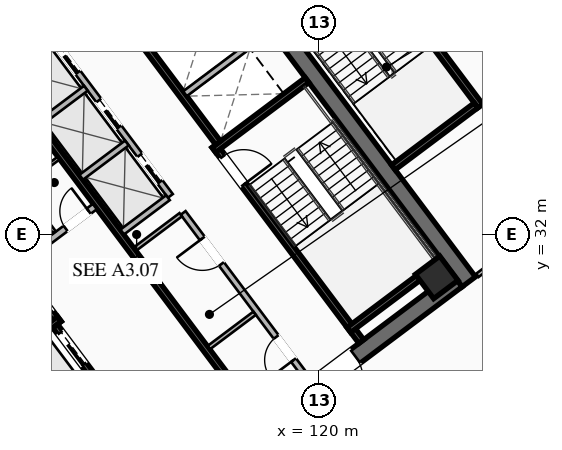
"""IFC4 building model, lengths in metres.
Left out: names, types, materials, properties, quantities, classifications, styles, units other than length and angle.
Written with IfcOpenShell. Run it as: python <this file> out.ifc"""

import sys

from ifc_helpers import new_model, si_unit, direction, frame, frame_2d, origin, origin_2d, place, context, subcontext, project, spatial, rectangle, hollow_rectangle, extrude, element, fill, save


model = new_model("IFC4")
c1 = context("Model", 3, precision=1e-05, world=origin(), true_north=direction((0.0, 1.0)))
c2 = subcontext(c1, "Body", "Model", "MODEL_VIEW")
j1 = project(units=[si_unit("LENGTHUNIT", "METRE"), si_unit("PLANEANGLEUNIT", "RADIAN")], contexts=[c1])
p1 = place(None, origin())
s1 = spatial("IfcSite", under=j1, at=p1, CompositionType="ELEMENT")
p2 = place(p1, origin())
s2 = spatial("IfcBuilding", under=s1, at=p2, CompositionType="ELEMENT")
p3 = place(p2, frame((0.0, 0.0, 188.95)))
s3 = spatial("IfcBuildingStorey", under=s2, at=p3, CompositionType="ELEMENT", Elevation=188.95)
for number, where, z_axis, x_axis in (
    (1, (112.436, 21.077, 0.0), (0.0, 0.0, 1.0), (-0.6, 0.8, 0.0)),
    (2, (115.564, 42.923, 0.0), (0.0, 0.0, 1.0), (0.6, -0.8, 0.0)),
):
    element("IfcWall", number, at=place(p3, frame(where, z_axis=z_axis, x_axis=x_axis)), inside=s3, PredefinedType="SHEAR", context=c2, shape_type="SweptSolid", body=[
        extrude(rectangle(XDim=15.6, YDim=0.55, at=frame_2d((7.8, 0.0))), origin(), (0.0, 0.0, 1.0), 3.55),
    ])
p4 = place(p3, frame((124.539, 30.498, 0.0), z_axis=(0.0, 0.0, 1.0), x_axis=(-0.799998054672, -0.600002593761, 0.0)))
e3 = element("IfcWall", 3, at=p4, inside=s3, PredefinedType="SHEAR", context=c2, shape_type="SweptSolid", body=[
    extrude(rectangle(XDim=15.06, YDim=0.55, at=frame_2d((7.53, 0.0))), origin(), (0.0, 0.0, 1.0), 3.55),
])
p5 = place(p4, frame((9.23, 0.0, 0.0)))
e4 = element("IfcOpeningElement", 4, at=p5, cuts=e3, PredefinedType="OPENING", context=c2, shape_type="SweptSolid", body=[
    extrude(rectangle(XDim=1.25, YDim=2.25, at=frame_2d((0.625, 1.125))), frame((0.0, 0.285, 0.0), z_axis=(0.0, -1.0, 0.0), x_axis=(1.0, 0.0, 0.0)), (0.0, 0.0, 1.0), 0.57),
])
p6 = place(p4, frame((4.18, 0.0, 0.0)))
e5 = element("IfcOpeningElement", 5, at=p6, cuts=e3, PredefinedType="OPENING", context=c2, shape_type="SweptSolid", body=[
    extrude(rectangle(XDim=1.25, YDim=2.25, at=frame_2d((0.625, 1.125))), frame((0.0, 0.285, 0.0), z_axis=(0.0, -1.0, 0.0), x_axis=(1.0, 0.0, 0.0)), (0.0, 0.0, 1.0), 0.57),
])
p7 = place(p3, frame((103.461, 33.502, 0.0), z_axis=(0.0, 0.0, 1.0), x_axis=(0.799998054672, 0.600002593761, 0.0)))
e6 = element("IfcWall", 6, at=p7, inside=s3, PredefinedType="SHEAR", context=c2, shape_type="SweptSolid", body=[
    extrude(rectangle(XDim=15.06, YDim=0.55, at=frame_2d((7.53, 0.0))), origin(), (0.0, 0.0, 1.0), 3.55),
])
p8 = place(p7, frame((4.58, 0.0, 0.0)))
e7 = element("IfcOpeningElement", 7, at=p8, cuts=e6, PredefinedType="OPENING", context=c2, shape_type="SweptSolid", body=[
    extrude(rectangle(XDim=1.25, YDim=2.25, at=frame_2d((0.625, 1.125))), frame((0.0, 0.285, 0.0), z_axis=(0.0, -1.0, 0.0), x_axis=(1.0, 0.0, 0.0)), (0.0, 0.0, 1.0), 0.57),
])
p9 = place(p7, frame((9.63, 0.0, 0.0)))
e8 = element("IfcOpeningElement", 8, at=p9, cuts=e6, PredefinedType="OPENING", context=c2, shape_type="SweptSolid", body=[
    extrude(rectangle(XDim=1.25, YDim=2.25, at=frame_2d((0.625, 1.125))), frame((0.0, 0.285, 0.0), z_axis=(0.0, -1.0, 0.0), x_axis=(1.0, 0.0, 0.0)), (0.0, 0.0, 1.0), 0.57),
])
p10 = place(p3, frame((123.87, 30.59, 0.0), z_axis=(0.0, 0.0, 1.0), x_axis=(0.799999996291, 0.600000004945, 0.0)))
e9 = element("IfcColumn", 9, at=p10, inside=s3, PredefinedType="COLUMN", context=c2, shape_type="SweptSolid", body=[
    extrude(hollow_rectangle(XDim=1.0, YDim=1.0, WallThickness=0.04, at=origin_2d()), origin(), (0.0, 0.0, 1.0), 3.37),
])
p11 = place(p3, frame((111.44, 29.08, 0.0), z_axis=(0.0, 0.0, 1.0), x_axis=(-0.59999029481, 0.8000072788, 0.0)))
e10 = element("IfcWall", 10, at=p11, inside=s3, PredefinedType="SHEAR", context=c2, shape_type="SweptSolid", body=[
    extrude(rectangle(XDim=8.05, YDim=0.2, at=frame_2d((4.025, 0.0))), origin(), (0.0, 0.0, 1.0), 3.37),
])
p12 = place(p11, frame((0.45, 0.0, 0.0)))
e11 = element("IfcOpeningElement", 11, at=p12, cuts=e10, PredefinedType="OPENING", context=c2, shape_type="SweptSolid", body=[
    extrude(rectangle(XDim=1.15, YDim=2.2, at=frame_2d((0.575, 1.1))), frame((0.0, 0.11, 0.0), z_axis=(0.0, -1.0, 0.0), x_axis=(1.0, 0.0, 0.0)), (0.0, 0.0, 1.0), 0.22),
])
p13 = place(p3, frame((108.396, 26.922, 0.0), z_axis=(0.0, 0.0, 1.0), x_axis=(0.800015298837, 0.599979601008, 0.0)))
e12 = element("IfcWall", 12, at=p13, inside=s3, PredefinedType="SHEAR", context=c2, shape_type="SweptSolid", body=[
    extrude(rectangle(XDim=3.83, YDim=0.2, at=frame_2d((1.915, 0.0))), origin(), (0.0, 0.0, 1.0), 3.37),
])
p14 = place(p3, frame((116.56, 34.92, 0.0), z_axis=(0.0, 0.0, 1.0), x_axis=(0.59999029481, -0.8000072788, 0.0)))
e13 = element("IfcWall", 13, at=p14, inside=s3, PredefinedType="SHEAR", context=c2, shape_type="SweptSolid", body=[
    extrude(rectangle(XDim=8.05, YDim=0.2, at=frame_2d((4.025, 0.0))), origin(), (0.0, 0.0, 1.0), 3.37),
])
p15 = place(p14, frame((0.45, 0.0, 0.0)))
e14 = element("IfcOpeningElement", 14, at=p15, cuts=e13, PredefinedType="OPENING", context=c2, shape_type="SweptSolid", body=[
    extrude(rectangle(XDim=1.15, YDim=2.2, at=frame_2d((0.575, 1.1))), frame((0.0, 0.11, 0.0), z_axis=(0.0, -1.0, 0.0), x_axis=(1.0, 0.0, 0.0)), (0.0, 0.0, 1.0), 0.22),
])
for number, where, z_axis, x_axis in (
    (15, (116.54, 34.78, 0.0), (0.0, 0.0, 1.0), (0.8, 0.6, 0.0)),
    (16, (120.98, 28.86, 0.0), (0.0, 0.0, 1.0), (0.8, 0.6, 0.0)),
):
    element("IfcWall", number, at=place(p3, frame(where, z_axis=z_axis, x_axis=x_axis)), inside=s3, PredefinedType="SHEAR", context=c2, shape_type="SweptSolid", body=[
        extrude(rectangle(XDim=3.83, YDim=0.2, at=frame_2d((1.915, 0.0))), origin(), (0.0, 0.0, 1.0), 3.37),
    ])
p16 = place(p3, frame((117.998, 25.936, 0.0), z_axis=(0.0, 0.0, 1.0), x_axis=(-0.600002693989, 0.799997979501, 0.0)))
e17 = element("IfcWall", 17, at=p16, inside=s3, PredefinedType="SHEAR", context=c2, shape_type="SweptSolid", body=[
    extrude(rectangle(XDim=14.5, YDim=0.2, at=frame_2d((7.25, 0.0))), origin(), (0.0, 0.0, 1.0), 3.37),
])
p17 = place(p3, frame((110.104, 31.028, 0.0), z_axis=(0.0, 0.0, 1.0), x_axis=(0.800018601094, 0.59997519774, 0.0)))
e18 = element("IfcWall", 18, at=p17, inside=s3, PredefinedType="SOLIDWALL", context=c2, shape_type="SweptSolid", body=[
    extrude(rectangle(XDim=3.15, YDim=0.22, at=frame_2d((1.575, 0.0))), origin(), (0.0, 0.0, 1.0), 2.723),
])
p18 = place(p17, frame((0.25, 0.0, 0.0)))
e19 = element("IfcOpeningElement", 19, at=p18, cuts=e18, PredefinedType="OPENING", context=c2, shape_type="SweptSolid", body=[
    extrude(rectangle(XDim=0.95, YDim=2.05, at=frame_2d((0.475, 1.025))), frame((0.0, 0.12, 0.0), z_axis=(0.0, -1.0, 0.0), x_axis=(1.0, 0.0, 0.0)), (0.0, 0.0, 1.0), 0.24),
])
p19 = place(p17, frame((1.95, 0.0, 0.0)))
e20 = element("IfcOpeningElement", 20, at=p19, cuts=e18, PredefinedType="OPENING", context=c2, shape_type="SweptSolid", body=[
    extrude(rectangle(XDim=0.95, YDim=2.05, at=frame_2d((0.475, 1.025))), frame((0.0, 0.12, 0.0), z_axis=(0.0, -1.0, 0.0), x_axis=(1.0, 0.0, 0.0)), (0.0, 0.0, 1.0), 0.24),
])
p20 = place(p3, frame((115.19, 23.83, 0.0), z_axis=(0.0, 0.0, 1.0), x_axis=(-0.599993943644, 0.800004542231, 0.0)))
e21 = element("IfcWall", 21, at=p20, inside=s3, PredefinedType="SHEAR", context=c2, shape_type="SweptSolid", body=[
    extrude(rectangle(XDim=6.45, YDim=0.2, at=frame_2d((3.225, 0.0))), origin(), (0.0, 0.0, 1.0), 3.37),
])
p21 = place(p20, frame((4.875, 0.0, 0.0)))
e22 = element("IfcOpeningElement", 22, at=p21, cuts=e21, PredefinedType="OPENING", context=c2, shape_type="SweptSolid", body=[
    extrude(rectangle(XDim=1.3, YDim=2.25, at=frame_2d((0.65, 1.125))), frame((0.0, 0.11, 0.0), z_axis=(0.0, -1.0, 0.0), x_axis=(1.0, 0.0, 0.0)), (0.0, 0.0, 1.0), 0.22),
])
p22 = place(p20, frame((2.875, 0.0, 0.0)))
e23 = element("IfcOpeningElement", 23, at=p22, cuts=e21, PredefinedType="OPENING", context=c2, shape_type="SweptSolid", body=[
    extrude(rectangle(XDim=1.3, YDim=2.25, at=frame_2d((0.65, 1.125))), frame((0.0, 0.11, 0.0), z_axis=(0.0, -1.0, 0.0), x_axis=(1.0, 0.0, 0.0)), (0.0, 0.0, 1.0), 0.22),
])
p23 = place(p20, frame((0.675, 0.0, 0.0)))
e24 = element("IfcOpeningElement", 24, at=p23, cuts=e21, PredefinedType="OPENING", context=c2, shape_type="SweptSolid", body=[
    extrude(rectangle(XDim=1.3, YDim=2.25, at=frame_2d((0.65, 1.125))), frame((0.0, 0.11, 0.0), z_axis=(0.0, -1.0, 0.0), x_axis=(1.0, 0.0, 0.0)), (0.0, 0.0, 1.0), 0.22),
])
p24 = place(p3, frame((112.81, 40.17, 0.0), z_axis=(0.0, 0.0, 1.0), x_axis=(0.599993943644, -0.800004542231, 0.0)))
e25 = element("IfcWall", 25, at=p24, inside=s3, PredefinedType="SHEAR", context=c2, shape_type="SweptSolid", body=[
    extrude(rectangle(XDim=6.45, YDim=0.2, at=frame_2d((3.225, 0.0))), origin(), (0.0, 0.0, 1.0), 3.37),
])
p25 = place(p3, frame((115.59, 36.63, 0.0), z_axis=(0.0, 0.0, 1.0), x_axis=(0.799974743577, 0.600033673754, 0.0)))
e26 = element("IfcWall", 26, at=p25, inside=s3, PredefinedType="SOLIDWALL", context=c2, shape_type="SweptSolid", body=[
    extrude(rectangle(XDim=3.48, YDim=0.2, at=frame_2d((1.74, 0.0))), origin(), (0.0, 0.0, 1.0), 3.37),
])
p26 = place(p3, frame((111.296, 32.072, 0.0), z_axis=(0.0, 0.0, 1.0), x_axis=(-0.59995887973, 0.800030838552, 0.0)))
e27 = element("IfcWall", 27, at=p26, inside=s3, PredefinedType="PARTITIONING", context=c2, shape_type="SweptSolid", body=[
    extrude(rectangle(XDim=3.8, YDim=0.11, at=frame_2d((1.9, 0.0))), origin(), (0.0, 0.0, 1.0), 2.723),
])
p27 = place(p3, frame((108.91, 32.62, 0.0), z_axis=(0.0, 0.0, 1.0), x_axis=(0.800018601094, 0.59997519774, 0.0)))
e28 = element("IfcWall", 28, at=p27, inside=s3, PredefinedType="PARTITIONING", context=c2, shape_type="SweptSolid", body=[
    extrude(rectangle(XDim=3.15, YDim=0.11, at=frame_2d((1.575, 0.0))), origin(), (0.0, 0.0, 1.0), 2.723),
])
p28 = place(p3, frame((119.67, 27.19, 0.0), z_axis=(0.0, 0.0, 1.0), x_axis=(-0.599988677396, 0.800008491828, 0.0)))
e29 = element("IfcWall", 29, at=p28, inside=s3, PredefinedType="SOLIDWALL", context=c2, shape_type="SweptSolid", body=[
    extrude(rectangle(XDim=6.9, YDim=0.2, at=frame_2d((3.45, 0.0))), origin(), (0.0, 0.0, 1.0), 2.723),
])
p29 = place(p28, frame((0.85, 0.0, 0.0)))
e30 = element("IfcOpeningElement", 30, at=p29, cuts=e29, PredefinedType="OPENING", context=c2, shape_type="SweptSolid", body=[
    extrude(rectangle(XDim=0.95, YDim=2.05, at=frame_2d((0.475, 1.025))), frame((0.0, 0.11, 0.0), z_axis=(0.0, -1.0, 0.0), x_axis=(1.0, 0.0, 0.0)), (0.0, 0.0, 1.0), 0.22),
])
p30 = place(p28, frame((4.8, 0.0, 0.0)))
e31 = element("IfcOpeningElement", 31, at=p30, cuts=e29, PredefinedType="OPENING", context=c2, shape_type="SweptSolid", body=[
    extrude(rectangle(XDim=1.05, YDim=2.2, at=frame_2d((0.525, 1.1))), frame((0.0, 0.11, 0.0), z_axis=(0.0, -1.0, 0.0), x_axis=(1.0, 0.0, 0.0)), (0.0, 0.0, 1.0), 0.22),
])
for number, where, z_axis, x_axis in (
    (32, (113.946, 31.522, 0.0), (0.0, 0.0, 1.0), (0.8, 0.6, 0.0)),
    (33, (116.376, 28.282, 0.0), (0.0, 0.0, 1.0), (0.8, 0.6, 0.0)),
):
    element("IfcWall", number, at=place(p3, frame(where, z_axis=z_axis, x_axis=x_axis)), inside=s3, PredefinedType="PARTITIONING", context=c2, shape_type="SweptSolid", body=[
        extrude(rectangle(XDim=1.88, YDim=0.135, at=frame_2d((0.94, 0.0))), origin(), (0.0, 0.0, 1.0), 2.723),
    ])
p31 = place(p3, frame((115.11, 33.27, 0.0), z_axis=(0.0, 0.0, 1.0), x_axis=(-0.600011322243, 0.799991508192, 0.0)))
e34 = element("IfcWall", 34, at=p31, inside=s3, PredefinedType="SOLIDWALL", context=c2, shape_type="SweptSolid", body=[
    extrude(rectangle(XDim=6.9, YDim=0.2, at=frame_2d((3.45, 0.0))), origin(), (0.0, 0.0, 1.0), 3.37),
])
p32 = place(p31, frame((0.575, 0.0, 0.0)))
e35 = element("IfcOpeningElement", 35, at=p32, cuts=e34, PredefinedType="OPENING", context=c2, shape_type="SweptSolid", body=[
    extrude(rectangle(XDim=1.1, YDim=2.2, at=frame_2d((0.55, 1.1))), frame((0.0, 0.11, 0.0), z_axis=(0.0, -1.0, 0.0), x_axis=(1.0, 0.0, 0.0)), (0.0, 0.0, 1.0), 0.22),
])
p33 = place(p31, frame((2.825, 0.0, 0.0)))
e36 = element("IfcOpeningElement", 36, at=p33, cuts=e34, PredefinedType="OPENING", context=c2, shape_type="SweptSolid", body=[
    extrude(rectangle(XDim=1.1, YDim=2.2, at=frame_2d((0.55, 1.1))), frame((0.0, 0.11, 0.0), z_axis=(0.0, -1.0, 0.0), x_axis=(1.0, 0.0, 0.0)), (0.0, 0.0, 1.0), 0.22),
])
p34 = place(p31, frame((5.075, 0.0, 0.0)))
e37 = element("IfcOpeningElement", 37, at=p34, cuts=e34, PredefinedType="OPENING", context=c2, shape_type="SweptSolid", body=[
    extrude(rectangle(XDim=1.1, YDim=2.2, at=frame_2d((0.55, 1.1))), frame((0.0, 0.11, 0.0), z_axis=(0.0, -1.0, 0.0), x_axis=(1.0, 0.0, 0.0)), (0.0, 0.0, 1.0), 0.22),
])
p35 = place(p3, frame((113.526, 32.082, 0.0), z_axis=(0.0, 0.0, 1.0), x_axis=(0.800046745961, 0.599937666993, 0.0)))
e38 = element("IfcWall", 38, at=p35, inside=s3, PredefinedType="SOLIDWALL", context=c2, shape_type="SweptSolid", body=[
    extrude(rectangle(XDim=1.88, YDim=0.2, at=frame_2d((0.94, 0.0))), origin(), (0.0, 0.0, 1.0), 3.37),
])
p36 = place(p3, frame((112.176, 33.882, 0.0), z_axis=(0.0, 0.0, 1.0), x_axis=(0.8, 0.6, 0.0)))
e39 = element("IfcWall", 39, at=p36, inside=s3, PredefinedType="SOLIDWALL", context=c2, shape_type="SweptSolid", body=[
    extrude(rectangle(XDim=1.88, YDim=0.2, at=frame_2d((0.94, 0.0))), origin(), (0.0, 0.0, 1.0), 3.37),
])
p37 = place(p3, frame((110.826, 35.682, 0.0), z_axis=(0.0, 0.0, 1.0), x_axis=(0.799984418148, 0.600020775241, 0.0)))
e40 = element("IfcWall", 40, at=p37, inside=s3, PredefinedType="SOLIDWALL", context=c2, shape_type="SweptSolid", body=[
    extrude(rectangle(XDim=1.88, YDim=0.2, at=frame_2d((0.94, 0.0))), origin(), (0.0, 0.0, 1.0), 3.37),
])
p38 = place(p3, frame((125.304, 36.228, 0.0), z_axis=(0.0, 0.0, 1.0), x_axis=(-0.59998851072, 0.800008616831, 0.0)))
e41 = element("IfcWall", 41, at=p38, inside=s3, PredefinedType="SHEAR", context=c2, shape_type="SweptSolid", body=[
    extrude(rectangle(XDim=6.8, YDim=0.2, at=frame_2d((3.4, 0.0))), origin(), (0.0, 0.0, 1.0), 3.37),
])
p39 = place(p3, frame((122.444, 34.208, 0.0), z_axis=(0.0, 0.0, 1.0), x_axis=(0.79999138319, 0.600011488909, 0.0)))
e42 = element("IfcWall", 42, at=p39, inside=s3, PredefinedType="SHEAR", context=c2, shape_type="SweptSolid", body=[
    extrude(rectangle(XDim=3.4, YDim=0.2, at=frame_2d((1.7, 0.0))), origin(), (0.0, 0.0, 1.0), 3.37),
])
p40 = place(p3, frame((95.638, 32.566, 0.0), z_axis=(0.0, 0.0, 1.0), x_axis=(0.8, 0.6, 0.0)))
e43 = element("IfcWall", 43, at=p40, inside=s3, PredefinedType="PARTITIONING", context=c2, shape_type="SweptSolid", body=[
    extrude(rectangle(XDim=28.7, YDim=0.135, at=frame_2d((14.35, 0.0))), origin(), (0.0, 0.0, 1.0), 2.723),
])
p41 = place(p40, frame((0.3, 0.0, 0.0)))
e44 = element("IfcOpeningElement", 44, at=p41, cuts=e43, PredefinedType="OPENING", context=c2, shape_type="SweptSolid", body=[
    extrude(rectangle(XDim=0.95, YDim=2.05, at=frame_2d((0.475, 1.025))), frame((0.0, 0.077, 0.0), z_axis=(0.0, -1.0, 0.0), x_axis=(1.0, 0.0, 0.0)), (0.0, 0.0, 1.0), 0.155),
])
p42 = place(p40, frame((14.083, 0.0, 0.0)))
e45 = element("IfcOpeningElement", 45, at=p42, cuts=e43, PredefinedType="OPENING", context=c2, shape_type="SweptSolid", body=[
    extrude(rectangle(XDim=0.95, YDim=2.05, at=frame_2d((0.475, 1.025))), frame((0.0, 0.077, 0.0), z_axis=(0.0, -1.0, 0.0), x_axis=(1.0, 0.0, 0.0)), (0.0, 0.0, 1.0), 0.155),
])
p43 = place(p40, frame((27.45, 0.0, 0.0)))
e46 = element("IfcOpeningElement", 46, at=p43, cuts=e43, PredefinedType="OPENING", context=c2, shape_type="SweptSolid", body=[
    extrude(rectangle(XDim=0.95, YDim=2.05, at=frame_2d((0.475, 1.025))), frame((0.0, 0.077, 0.0), z_axis=(0.0, -1.0, 0.0), x_axis=(1.0, 0.0, 0.0)), (0.0, 0.0, 1.0), 0.155),
])
p44 = place(p3, frame((131.87, 32.09, 0.0), z_axis=(0.0, 0.0, 1.0), x_axis=(-0.800003062365, -0.599995916825, 0.0)))
e47 = element("IfcWall", 47, at=p44, inside=s3, PredefinedType="PARTITIONING", context=c2, shape_type="SweptSolid", body=[
    extrude(rectangle(XDim=28.7, YDim=0.135, at=frame_2d((14.35, 0.0))), origin(), (0.0, 0.0, 1.0), 2.723),
])
p45 = place(p44, frame((27.37, 0.0, 0.0)))
e48 = element("IfcOpeningElement", 48, at=p45, cuts=e47, PredefinedType="OPENING", context=c2, shape_type="SweptSolid", body=[
    extrude(rectangle(XDim=0.95, YDim=2.05, at=frame_2d((0.475, 1.025))), frame((0.0, 0.077, 0.0), z_axis=(0.0, -1.0, 0.0), x_axis=(1.0, 0.0, 0.0)), (0.0, 0.0, 1.0), 0.155),
])
p46 = place(p44, frame((13.638, 0.0, 0.0)))
e49 = element("IfcOpeningElement", 49, at=p46, cuts=e47, PredefinedType="OPENING", context=c2, shape_type="SweptSolid", body=[
    extrude(rectangle(XDim=0.95, YDim=2.05, at=frame_2d((0.475, 1.025))), frame((0.0, 0.077, 0.0), z_axis=(0.0, -1.0, 0.0), x_axis=(1.0, 0.0, 0.0)), (0.0, 0.0, 1.0), 0.155),
])
p47 = place(p44, frame((0.38, 0.0, 0.0)))
e50 = element("IfcOpeningElement", 50, at=p47, cuts=e47, PredefinedType="OPENING", context=c2, shape_type="SweptSolid", body=[
    extrude(rectangle(XDim=0.95, YDim=2.05, at=frame_2d((0.475, 1.025))), frame((0.0, 0.077, 0.0), z_axis=(0.0, -1.0, 0.0), x_axis=(1.0, 0.0, 0.0)), (0.0, 0.0, 1.0), 0.155),
])
p48 = place(p3, frame((125.208, 30.656, 0.0), z_axis=(0.0, 0.0, 1.0), x_axis=(0.800006797429, 0.599990936654, 0.0)))
e51 = element("IfcWall", 51, at=p48, inside=s3, PredefinedType="PARTITIONING", context=c2, shape_type="SweptSolid", body=[
    extrude(rectangle(XDim=8.62, YDim=0.135, at=frame_2d((4.31, 0.0))), origin(), (0.0, 0.0, 1.0), 2.723),
])
p49 = place(p48, frame((2.045, 0.0, 0.0)))
e52 = element("IfcOpeningElement", 52, at=p49, cuts=e51, PredefinedType="OPENING", context=c2, shape_type="SweptSolid", body=[
    extrude(rectangle(XDim=0.95, YDim=2.05, at=frame_2d((0.475, 1.025))), frame((0.0, 0.077, 0.0), z_axis=(0.0, -1.0, 0.0), x_axis=(1.0, 0.0, 0.0)), (0.0, 0.0, 1.0), 0.155),
])
p50 = place(p3, frame((112.104, 20.928, 0.0), z_axis=(0.0, 0.0, 1.0), x_axis=(-0.599994940075, 0.800003794918, 0.0)))
e53 = element("IfcWall", 53, at=p50, inside=s3, PredefinedType="PARTITIONING", context=c2, shape_type="SweptSolid", body=[
    extrude(rectangle(XDim=15.44, YDim=0.135, at=frame_2d((7.72, 0.0))), origin(), (0.0, 0.0, 1.0), 2.723),
])
p51 = place(p6, origin())
e54 = element("IfcDoor", 54, at=p51, inside=s3, OperationType="SINGLE_SWING_RIGHT", PredefinedType="DOOR", context=c2, shape_type="SweptSolid", body=[
    extrude(rectangle(XDim=1.25, YDim=2.25, at=frame_2d((0.625, 1.125))), frame((0.0, 0.025, 0.0), z_axis=(0.0, -1.0, 0.0), x_axis=(1.0, 0.0, 0.0)), (0.0, 0.0, 1.0), 0.05),
])
fill(e5, e54)
p52 = place(p15, origin())
e55 = element("IfcDoor", 55, at=p52, inside=s3, OperationType="SINGLE_SWING_RIGHT", PredefinedType="DOOR", context=c2, shape_type="SweptSolid", body=[
    extrude(rectangle(XDim=1.15, YDim=2.2, at=frame_2d((0.575, 1.1))), frame((0.0, 0.025, 0.0), z_axis=(0.0, -1.0, 0.0), x_axis=(1.0, 0.0, 0.0)), (0.0, 0.0, 1.0), 0.05),
])
fill(e14, e55)
p53 = place(p19, origin())
e56 = element("IfcDoor", 56, at=p53, inside=s3, OperationType="SINGLE_SWING_RIGHT", PredefinedType="DOOR", context=c2, shape_type="SweptSolid", body=[
    extrude(rectangle(XDim=0.95, YDim=2.05, at=frame_2d((0.475, 1.025))), frame((0.0, 0.025, 0.0), z_axis=(0.0, -1.0, 0.0), x_axis=(1.0, 0.0, 0.0)), (0.0, 0.0, 1.0), 0.05),
])
fill(e20, e56)
p54 = place(p29, origin())
e57 = element("IfcDoor", 57, at=p54, inside=s3, OperationType="SINGLE_SWING_LEFT", PredefinedType="DOOR", context=c2, shape_type="SweptSolid", body=[
    extrude(rectangle(XDim=0.95, YDim=2.05, at=frame_2d((0.475, 1.025))), frame((0.0, 0.025, 0.0), z_axis=(0.0, -1.0, 0.0), x_axis=(1.0, 0.0, 0.0)), (0.0, 0.0, 1.0), 0.05),
])
fill(e30, e57)
p55 = place(p30, origin())
e58 = element("IfcDoor", 58, at=p55, inside=s3, OperationType="SINGLE_SWING_RIGHT", PredefinedType="DOOR", context=c2, shape_type="SweptSolid", body=[
    extrude(rectangle(XDim=1.05, YDim=2.2, at=frame_2d((0.525, 1.1))), frame((0.0, 0.025, 0.0), z_axis=(0.0, -1.0, 0.0), x_axis=(1.0, 0.0, 0.0)), (0.0, 0.0, 1.0), 0.05),
])
fill(e31, e58)
p56 = place(p21, origin())
e59 = element("IfcDoor", 59, at=p56, inside=s3, OperationType="SLIDING_TO_LEFT", PredefinedType="DOOR", context=c2, shape_type="SweptSolid", body=[
    extrude(rectangle(XDim=1.3, YDim=2.25, at=frame_2d((0.65, 1.125))), frame((0.0, 0.025, 0.0), z_axis=(0.0, -1.0, 0.0), x_axis=(1.0, 0.0, 0.0)), (0.0, 0.0, 1.0), 0.05),
])
fill(e22, e59)
p57 = place(p32, origin())
e60 = element("IfcDoor", 60, at=p57, inside=s3, OperationType="SLIDING_TO_LEFT", PredefinedType="DOOR", context=c2, shape_type="SweptSolid", body=[
    extrude(rectangle(XDim=1.1, YDim=2.2, at=frame_2d((0.55, 1.1))), frame((0.0, 0.025, 0.0), z_axis=(0.0, -1.0, 0.0), x_axis=(1.0, 0.0, 0.0)), (0.0, 0.0, 1.0), 0.05),
])
fill(e35, e60)
p58 = place(p33, origin())
e61 = element("IfcDoor", 61, at=p58, inside=s3, OperationType="SLIDING_TO_LEFT", PredefinedType="DOOR", context=c2, shape_type="SweptSolid", body=[
    extrude(rectangle(XDim=1.1, YDim=2.2, at=frame_2d((0.55, 1.1))), frame((0.0, 0.025, 0.0), z_axis=(0.0, -1.0, 0.0), x_axis=(1.0, 0.0, 0.0)), (0.0, 0.0, 1.0), 0.05),
])
fill(e36, e61)
p59 = place(p34, origin())
e62 = element("IfcDoor", 62, at=p59, inside=s3, OperationType="SLIDING_TO_LEFT", PredefinedType="DOOR", context=c2, shape_type="SweptSolid", body=[
    extrude(rectangle(XDim=1.1, YDim=2.2, at=frame_2d((0.55, 1.1))), frame((0.0, 0.025, 0.0), z_axis=(0.0, -1.0, 0.0), x_axis=(1.0, 0.0, 0.0)), (0.0, 0.0, 1.0), 0.05),
])
fill(e37, e62)
save(model, sys.argv[1])
